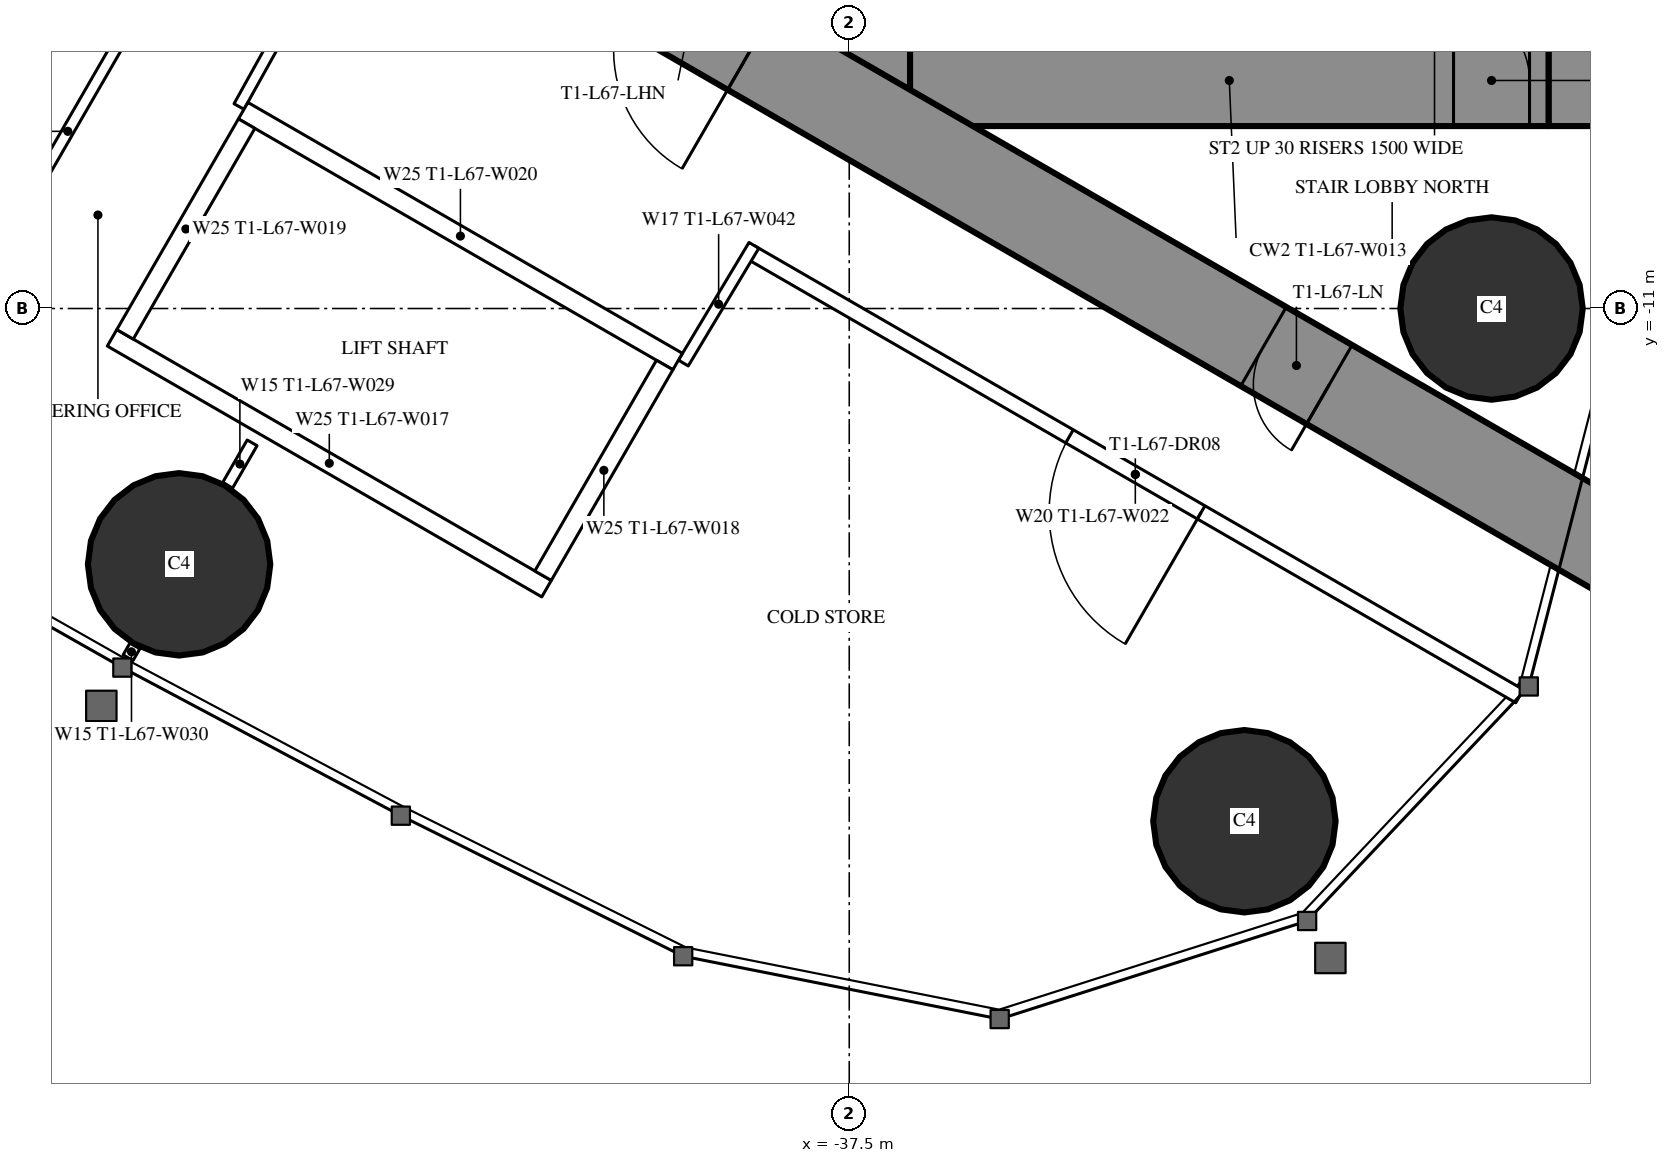
"""IFC4 building model, lengths in metres.
Left out: names, types, materials, properties, quantities, classifications, styles, units other than length and angle.
Written with IfcOpenShell. Run it as: python <this file> out.ifc"""

import sys

from ifc_helpers import new_model, si_unit, direction, frame, frame_2d, origin, origin_2d, place, context, subcontext, project, spatial, rectangle, circle, extrude, element, fill, save


model = new_model("IFC4")
c1 = context("Model", 3, precision=1e-05, world=origin(), true_north=direction((0.0, 1.0)))
c2 = subcontext(c1, "Body", "Model", "MODEL_VIEW")
j1 = project(units=[si_unit("LENGTHUNIT", "METRE"), si_unit("PLANEANGLEUNIT", "RADIAN")], contexts=[c1])
p1 = place(None, origin())
s1 = spatial("IfcSite", under=j1, at=p1, CompositionType="ELEMENT")
p2 = place(p1, origin())
s2 = spatial("IfcBuilding", under=s1, at=p2, CompositionType="ELEMENT")
p3 = place(p2, frame((0.0, 0.0, 251.9)))
s3 = spatial("IfcBuildingStorey", under=s2, at=p3, CompositionType="ELEMENT", Elevation=251.9)
for number, where, z_axis, x_axis in (
    (1, (-32.301, -17.745, 0.0), (0.0, 0.0, 1.0), (1.0, 0.0, 0.0)),
    (2, (-29.05, -11.0, 0.0), (0.0, 0.0, 1.0), (1.0, 0.0, 0.0)),
    (3, (-46.317, -14.365, 0.0), (0.0, 0.0, 1.0), (1.0, 0.0, 0.0)),
):
    element("IfcColumn", number, at=place(p3, frame(where, z_axis=z_axis, x_axis=x_axis)), inside=s3, PredefinedType="COLUMN", context=c2, shape_type="SweptSolid", body=[
        extrude(circle(Radius=1.2, at=origin_2d()), origin(), (0.0, 0.0, 1.0), 5.4),
    ])
p4 = place(p3, frame((-27.9, 8.6, 0.0), z_axis=(0.0, 0.0, 1.0), x_axis=(0.0, -1.0, 0.0)))
e4 = element("IfcWall", 4, at=p4, inside=s3, PredefinedType="SHEAR", context=c2, shape_type="SweptSolid", body=[
    extrude(rectangle(XDim=17.2, YDim=0.8, at=frame_2d((8.6, 0.0))), origin(), (0.0, 0.0, 1.0), 5.4),
])
p5 = place(p4, frame((6.95, 0.0, 0.0)))
e5 = element("IfcOpeningElement", 5, at=p5, cuts=e4, PredefinedType="OPENING", context=c2, shape_type="SweptSolid", body=[
    extrude(rectangle(XDim=0.9, YDim=2.2, at=frame_2d((0.45, 1.1))), frame((0.0, 0.41, 0.0), z_axis=(0.0, -1.0, 0.0), x_axis=(1.0, 0.0, 0.0)), (0.0, 0.0, 1.0), 0.82),
])
p6 = place(p3, frame((-37.3, 8.6, 0.0), z_axis=(0.0, 0.0, 1.0), x_axis=(0.0, -1.0, 0.0)))
e6 = element("IfcWall", 6, at=p6, inside=s3, PredefinedType="SHEAR", context=c2, shape_type="SweptSolid", body=[
    extrude(rectangle(XDim=17.2, YDim=1.2, at=frame_2d((8.6, 0.0))), origin(), (0.0, 0.0, 1.0), 5.4),
])
p7 = place(p6, frame((7.7, 0.0, 0.0)))
e7 = element("IfcOpeningElement", 7, at=p7, cuts=e6, PredefinedType="OPENING", context=c2, shape_type="SweptSolid", body=[
    extrude(rectangle(XDim=1.8, YDim=2.2, at=frame_2d((0.9, 1.1))), frame((0.0, 0.61, 0.0), z_axis=(0.0, -1.0, 0.0), x_axis=(1.0, 0.0, 0.0)), (0.0, 0.0, 1.0), 1.22),
])
p8 = place(p3, frame((-28.3, -8.0, 0.0), z_axis=(0.0, 0.0, 1.0), x_axis=(-1.0, 0.0, 0.0)))
e8 = element("IfcWall", 8, at=p8, inside=s3, PredefinedType="SHEAR", context=c2, shape_type="SweptSolid", body=[
    extrude(rectangle(XDim=8.4, YDim=1.2, at=frame_2d((4.2, 0.0))), origin(), (0.0, 0.0, 1.0), 5.4),
])
p9 = place(p8, frame((0.25, 0.0, 0.0)))
e9 = element("IfcOpeningElement", 9, at=p9, cuts=e8, PredefinedType="OPENING", context=c2, shape_type="SweptSolid", body=[
    extrude(rectangle(XDim=1.0, YDim=2.2, at=frame_2d((0.5, 1.1))), frame((0.0, 0.61, 0.0), z_axis=(0.0, -1.0, 0.0), x_axis=(1.0, 0.0, 0.0)), (0.0, 0.0, 1.0), 1.22),
])
p10 = place(p3, frame((-27.2, -14.3, 0.0), z_axis=(0.0, 0.0, 1.0), x_axis=(-0.866024021859, 0.500002393557, 0.0)))
e10 = element("IfcWall", 10, at=p10, inside=s3, PredefinedType="SHEAR", context=c2, shape_type="SweptSolid", body=[
    extrude(rectangle(XDim=27.907, YDim=1.2, at=frame_2d((13.954, 0.0))), origin(), (0.0, 0.0, 1.0), 5.4),
])
p11 = place(p10, frame((4.6, 0.0, 0.0)))
e11 = element("IfcOpeningElement", 11, at=p11, cuts=e10, PredefinedType="OPENING", context=c2, shape_type="SweptSolid", body=[
    extrude(rectangle(XDim=1.0, YDim=2.2, at=frame_2d((0.5, 1.1))), frame((0.0, 0.61, 0.0), z_axis=(0.0, -1.0, 0.0), x_axis=(1.0, 0.0, 0.0)), (0.0, 0.0, 1.0), 1.22),
])
p12 = place(p10, frame((13.395, 0.0, 0.0)))
e12 = element("IfcOpeningElement", 12, at=p12, cuts=e10, PredefinedType="OPENING", context=c2, shape_type="SweptSolid", body=[
    extrude(rectangle(XDim=1.8, YDim=2.2, at=frame_2d((0.9, 1.1))), frame((0.0, 0.61, 0.0), z_axis=(0.0, -1.0, 0.0), x_axis=(1.0, 0.0, 0.0)), (0.0, 0.0, 1.0), 1.22),
])
p13 = place(p3, frame((-46.898, -15.439, 0.0), z_axis=(0.0, 0.0, 1.0), x_axis=(-0.500232303069, -0.865891241997, 0.0)))
e13 = element("IfcWall", 13, at=p13, inside=s3, PredefinedType="PARTITIONING", context=c2, shape_type="SweptSolid", body=[
    extrude(rectangle(XDim=0.18, YDim=0.15, at=frame_2d((0.09, 0.0))), origin(), (0.0, 0.0, 1.0), 4.25),
])
p14 = place(p3, frame((-46.274, -6.059, 0.0), z_axis=(0.0, 0.0, 1.0), x_axis=(-0.500020471368, -0.866013584312, 0.0)))
e14 = element("IfcWall", 14, at=p14, inside=s3, PredefinedType="PARTITIONING", context=c2, shape_type="SweptSolid", body=[
    extrude(rectangle(XDim=6.028, YDim=0.15, at=frame_2d((3.014, 0.0))), origin(), (0.0, 0.0, 1.0), 4.25),
])
p15 = place(p3, frame((-45.356, -12.767, 0.0), z_axis=(0.0, 0.0, 1.0), x_axis=(-0.499886366516, -0.866091000168, 0.0)))
e15 = element("IfcWall", 15, at=p15, inside=s3, PredefinedType="PARTITIONING", context=c2, shape_type="SweptSolid", body=[
    extrude(rectangle(XDim=0.645, YDim=0.15, at=frame_2d((0.322, 0.0))), origin(), (0.0, 0.0, 1.0), 5.15),
])
p16 = place(p3, frame((-28.681, -16.101, 0.0), z_axis=(0.0, 0.0, 1.0), x_axis=(-0.866026079773, 0.499998829152, 0.0)))
e16 = element("IfcWall", 16, at=p16, inside=s3, PredefinedType="PARTITIONING", context=c2, shape_type="SweptSolid", body=[
    extrude(rectangle(XDim=11.674, YDim=0.2, at=frame_2d((5.837, 0.0))), origin(), (0.0, 0.0, 1.0), 5.15),
])
p17 = place(p16, frame((4.837, 0.0, 0.0)))
e17 = element("IfcOpeningElement", 17, at=p17, cuts=e16, PredefinedType="OPENING", context=c2, shape_type="SweptSolid", body=[
    extrude(rectangle(XDim=2.0, YDim=2.4, at=frame_2d((1.0, 1.2))), frame((0.0, 0.11, 0.0), z_axis=(0.0, -1.0, 0.0), x_axis=(1.0, 0.0, 0.0)), (0.0, 0.0, 1.0), 0.22),
])
for number, where, z_axis, x_axis in (
    (18, (-44.652, -6.764, 0.0), (0.0, 0.0, 1.0), (-0.486, -0.874, 0.0)),
    (19, (-39.683, -11.718, 0.0), (0.0, 0.0, 1.0), (0.514, 0.858, 0.0)),
):
    element("IfcWall", number, at=place(p3, frame(where, z_axis=z_axis, x_axis=x_axis)), inside=s3, PredefinedType="PARTITIONING", context=c2, shape_type="SweptSolid", body=[
        extrude(rectangle(XDim=1.805, YDim=0.15, at=frame_2d((0.903, 0.0))), origin(), (0.0, 0.0, 1.0), 5.15),
    ])
p18 = place(p3, frame((-39.758, -11.697, 0.0), z_axis=(0.0, 0.0, 1.0), x_axis=(-0.866024194504, 0.500002094529, 0.0)))
e20 = element("IfcWall", 20, at=p18, inside=s3, PredefinedType="PARTITIONING", context=c2, shape_type="SweptSolid", body=[
    extrude(rectangle(XDim=6.6, YDim=0.25, at=frame_2d((3.3, 0.0))), origin(), (0.0, 0.0, 1.0), 5.15),
])
p19 = place(p3, frame((-41.482, -14.686, 0.0), z_axis=(0.0, 0.0, 1.0), x_axis=(-0.86603344179, 0.499986077507, 0.0)))
e21 = element("IfcWall", 21, at=p19, inside=s3, PredefinedType="PARTITIONING", context=c2, shape_type="SweptSolid", body=[
    extrude(rectangle(XDim=6.6, YDim=0.25, at=frame_2d((3.3, 0.0))), origin(), (0.0, 0.0, 1.0), 5.15),
])
for number, where, z_axis, x_axis in (
    (22, (-39.928, -11.743, 0.0), (0.0, 0.0, 1.0), (-0.5, -0.866, 0.0)),
    (23, (-45.428, -8.568, 0.0), (0.0, 0.0, 1.0), (-0.5, -0.866, 0.0)),
):
    element("IfcWall", number, at=place(p3, frame(where, z_axis=z_axis, x_axis=x_axis)), inside=s3, PredefinedType="PARTITIONING", context=c2, shape_type="SweptSolid", body=[
        extrude(rectangle(XDim=3.201, YDim=0.25, at=frame_2d((1.6, 0.0))), origin(), (0.0, 0.0, 1.0), 5.15),
    ])
p20 = place(p17, origin())
e24 = element("IfcDoor", 24, at=p20, inside=s3, OperationType="DOUBLE_DOOR_SINGLE_SWING", PredefinedType="DOOR", context=c2, shape_type="SweptSolid", body=[
    extrude(rectangle(XDim=2.0, YDim=2.4, at=frame_2d((1.0, 1.2))), frame((0.0, 0.025, 0.0), z_axis=(0.0, -1.0, 0.0), x_axis=(1.0, 0.0, 0.0)), (0.0, 0.0, 1.0), 0.05),
])
fill(e17, e24)
p21 = place(p11, origin())
e25 = element("IfcDoor", 25, at=p21, inside=s3, OperationType="SINGLE_SWING_LEFT", PredefinedType="DOOR", context=c2, shape_type="SweptSolid", body=[
    extrude(rectangle(XDim=1.0, YDim=2.2, at=frame_2d((0.5, 1.1))), frame((0.0, 0.025, 0.0), z_axis=(0.0, -1.0, 0.0), x_axis=(1.0, 0.0, 0.0)), (0.0, 0.0, 1.0), 0.05),
])
fill(e11, e25)
p22 = place(p9, origin())
e26 = element("IfcDoor", 26, at=p22, inside=s3, OperationType="SINGLE_SWING_RIGHT", PredefinedType="DOOR", context=c2, shape_type="SweptSolid", body=[
    extrude(rectangle(XDim=1.0, YDim=2.2, at=frame_2d((0.5, 1.1))), frame((0.0, 0.025, 0.0), z_axis=(0.0, -1.0, 0.0), x_axis=(1.0, 0.0, 0.0)), (0.0, 0.0, 1.0), 0.05),
])
fill(e9, e26)
save(model, sys.argv[1])
